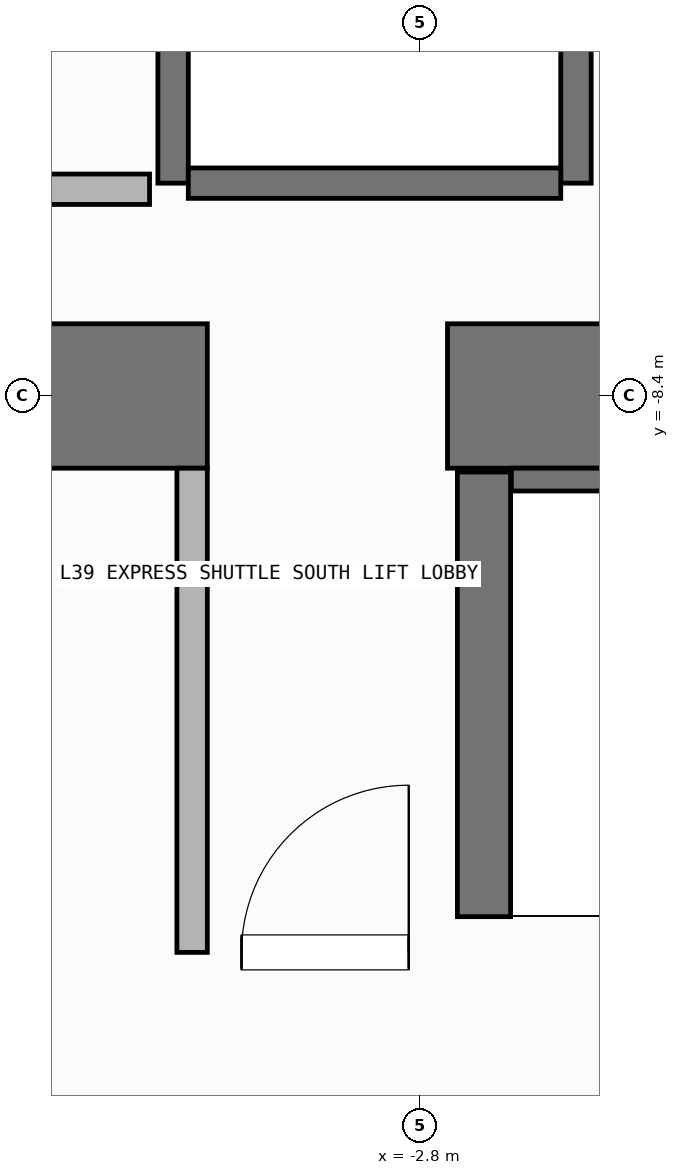
"""IFC4 building model, lengths in metres.
Left out: names, types, materials, properties, quantities, classifications, styles, units other than length and angle.
Written with IfcOpenShell. Run it as: python <this file> out.ifc"""

import sys

from ifc_helpers import new_model, si_unit, direction, frame, frame_2d, origin, place, context, subcontext, project, spatial, rectangle, extrude, element, fill, save


model = new_model("IFC4")
c1 = context("Model", 3, precision=1e-05, world=origin(), true_north=direction((0.0, 1.0)))
c2 = subcontext(c1, "Body", "Model", "MODEL_VIEW")
j1 = project(units=[si_unit("LENGTHUNIT", "METRE"), si_unit("PLANEANGLEUNIT", "RADIAN")], contexts=[c1])
p1 = place(None, origin())
s1 = spatial("IfcSite", under=j1, at=p1, CompositionType="ELEMENT")
p2 = place(p1, origin())
s2 = spatial("IfcBuilding", under=s1, at=p2, CompositionType="ELEMENT")
p3 = place(p2, frame((0.0, 0.0, 156.3)))
s3 = spatial("IfcBuildingStorey", under=s2, at=p3, CompositionType="ELEMENT", Elevation=156.3)
p4 = place(p3, frame((-7.55, -8.4, 0.0), z_axis=(0.0, 0.0, 1.0), x_axis=(1.0, 0.0, 0.0)))
e1 = element("IfcWall", 1, at=p4, inside=s3, PredefinedType="SHEAR", context=c2, shape_type="SweptSolid", body=[
    extrude(rectangle(XDim=3.35, YDim=0.95, at=frame_2d((1.675, 0.0))), origin(), (0.0, 0.0, 1.0), 7.8),
])
p5 = place(p3, frame((-2.62, -8.4, 0.0), z_axis=(0.0, 0.0, 1.0), x_axis=(1.0, 0.0, 0.0)))
e2 = element("IfcWall", 2, at=p5, inside=s3, PredefinedType="SHEAR", context=c2, shape_type="SweptSolid", body=[
    extrude(rectangle(XDim=7.27, YDim=0.95, at=frame_2d((3.635, 0.0))), origin(), (0.0, 0.0, 1.0), 7.8),
])
p6 = place(p3, frame((-2.555, -12.0, 0.0), z_axis=(0.0, 0.0, 1.0), x_axis=(1.0, 0.0, 0.0)))
e3 = element("IfcWall", 3, at=p6, inside=s3, PredefinedType="SHEAR", context=c2, shape_type="SweptSolid", body=[
    extrude(rectangle(XDim=7.31, YDim=0.35, at=frame_2d((3.655, 0.0))), origin(), (0.0, 0.0, 1.0), 7.8),
])
p7 = place(p3, frame((-2.2, -8.95, 0.0), z_axis=(0.0, 0.0, 1.0), x_axis=(1.0, 0.0, 0.0)))
e4 = element("IfcWall", 4, at=p7, inside=s3, PredefinedType="SHEAR", context=c2, shape_type="SweptSolid", body=[
    extrude(rectangle(XDim=6.6, YDim=0.15, at=frame_2d((3.3, 0.0))), origin(), (0.0, 0.0, 1.0), 7.8),
])
p8 = place(p3, frame((-2.38, -11.825, 0.0), z_axis=(0.0, 0.0, 1.0), x_axis=(0.0, 1.0, 0.0)))
e5 = element("IfcWall", 5, at=p8, inside=s3, PredefinedType="SHEAR", context=c2, shape_type="SweptSolid", body=[
    extrude(rectangle(XDim=2.925, YDim=0.35, at=frame_2d((1.462, 0.0))), origin(), (0.0, 0.0, 1.0), 7.8),
])
for number, where, z_axis, x_axis in (
    (6, (-4.425, -7.0, 0.0), (0.0, 0.0, 1.0), (0.0, 1.0, 0.0)),
    (7, (-1.775, -7.0, 0.0), (0.0, 0.0, 1.0), (0.0, 1.0, 0.0)),
):
    element("IfcWall", number, at=place(p3, frame(where, z_axis=z_axis, x_axis=x_axis)), inside=s3, PredefinedType="SHEAR", context=c2, shape_type="SweptSolid", body=[
        extrude(rectangle(XDim=2.8, YDim=0.2, at=frame_2d((1.4, 0.0))), origin(), (0.0, 0.0, 1.0), 7.58),
    ])
p9 = place(p3, frame((-4.325, -7.0, 0.0), z_axis=(0.0, 0.0, 1.0), x_axis=(1.0, 0.0, 0.0)))
e8 = element("IfcWall", 8, at=p9, inside=s3, PredefinedType="SHEAR", context=c2, shape_type="SweptSolid", body=[
    extrude(rectangle(XDim=2.45, YDim=0.2, at=frame_2d((1.225, 0.0))), origin(), (0.0, 0.0, 1.0), 7.58),
])
p10 = place(p3, frame((-4.3, -12.06, 0.0), z_axis=(0.0, 0.0, 1.0), x_axis=(1.0, 0.0, 0.0)))
e9 = element("IfcWall", 9, at=p10, inside=s3, PredefinedType="SOLIDWALL", context=c2, shape_type="SweptSolid", body=[
    extrude(rectangle(XDim=1.75, YDim=0.2, at=frame_2d((0.875, 0.0))), origin(), (0.0, 0.0, 1.0), 7.58),
])
p11 = place(p10, frame((0.325, 0.0, 0.0)))
e10 = element("IfcOpeningElement", 10, at=p11, cuts=e9, PredefinedType="OPENING", context=c2, shape_type="SweptSolid", body=[
    extrude(rectangle(XDim=1.1, YDim=2.15, at=frame_2d((0.55, 1.075))), frame((0.0, 0.11, 0.0), z_axis=(0.0, -1.0, 0.0), x_axis=(1.0, 0.0, 0.0)), (0.0, 0.0, 1.0), 0.22),
])
p12 = place(p3, frame((-4.3, -12.06, 0.0), z_axis=(0.0, 0.0, 1.0), x_axis=(0.0, 1.0, 0.0)))
e11 = element("IfcWall", 11, at=p12, inside=s3, PredefinedType="SOLIDWALL", context=c2, shape_type="SweptSolid", body=[
    extrude(rectangle(XDim=3.185, YDim=0.2, at=frame_2d((1.593, 0.0))), origin(), (0.0, 0.0, 1.0), 7.58),
])
p13 = place(p3, frame((-7.38, -7.04, 0.0), z_axis=(0.0, 0.0, 1.0), x_axis=(1.0, 0.0, 0.0)))
e12 = element("IfcWall", 12, at=p13, inside=s3, PredefinedType="SOLIDWALL", context=c2, shape_type="SweptSolid", body=[
    extrude(rectangle(XDim=2.8, YDim=0.2, at=frame_2d((1.4, 0.0))), origin(), (0.0, 0.0, 1.0), 7.58),
])
p14 = place(p11, origin())
e13 = element("IfcDoor", 13, at=p14, inside=s3, OperationType="SINGLE_SWING_RIGHT", PredefinedType="DOOR", context=c2, shape_type="SweptSolid", body=[
    extrude(rectangle(XDim=1.1, YDim=2.15, at=frame_2d((0.55, 1.075))), frame((0.0, 0.025, 0.0), z_axis=(0.0, -1.0, 0.0), x_axis=(1.0, 0.0, 0.0)), (0.0, 0.0, 1.0), 0.05),
])
fill(e10, e13)
save(model, sys.argv[1])
